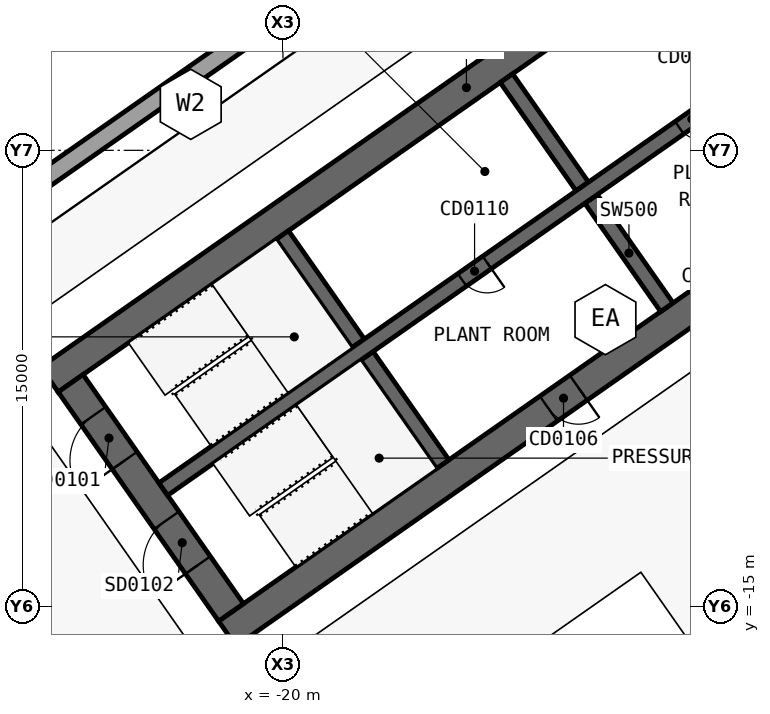
"""IFC4 building model, lengths in metres.
Left out: names, types, materials, properties, quantities, classifications, styles, units other than length and angle.
Written with IfcOpenShell. Run it as: python <this file> out.ifc"""

import sys

from ifc_helpers import new_model, si_unit, direction, frame, frame_2d, origin, place, context, subcontext, project, spatial, polyline, rectangle, outline, extrude, element, fill, save


model = new_model("IFC4")
c1 = context("Model", 3, precision=1e-05, world=origin(), true_north=direction((0.0, 1.0)))
c2 = subcontext(c1, "Body", "Model", "MODEL_VIEW")
j1 = project(units=[si_unit("LENGTHUNIT", "METRE"), si_unit("PLANEANGLEUNIT", "RADIAN")], contexts=[c1])
p1 = place(None, origin())
s1 = spatial("IfcSite", under=j1, at=p1, CompositionType="ELEMENT")
p2 = place(p1, origin())
s2 = spatial("IfcBuilding", under=s1, at=p2, CompositionType="ELEMENT")
p3 = place(p2, frame((0.0, 0.0, -9.0)))
s3 = spatial("IfcBuildingStorey", under=s2, at=p3, CompositionType="ELEMENT", Elevation=-9.0)
p4 = place(p3, frame((0.172, 18.676, 0.0), z_axis=(0.0, 0.0, 1.0), x_axis=(-0.819154640404, -0.573572728697, 0.0)))
e1 = element("IfcWall", 1, at=p4, inside=s3, PredefinedType="SOLIDWALL", context=c2, shape_type="SweptSolid", body=[
    extrude(outline(polyline([(34.922, 0.3), (35.633, -0.198), (35.633, -0.3), (28.946, -0.3), (0.638, -0.3), (0.42, 0.3), (34.922, 0.3)])), origin(), (0.0, 0.0, 1.0), 4.5),
])
p5 = place(p3, frame((0.037, 11.867, 0.0), z_axis=(0.0, 0.0, 1.0), x_axis=(-0.819155306259, -0.573571777746, 0.0)))
e2 = element("IfcWall", 2, at=p5, inside=s3, PredefinedType="SHEAR", context=c2, shape_type="SweptSolid", body=[
    extrude(outline(polyline([(33.837, 0.5), (0.7, 0.5), (0.0, -0.5), (33.837, -0.5), (33.837, 0.5)])), origin(), (0.0, 0.0, 1.0), 4.5),
])
p6 = place(p3, frame((0.037, -0.585, 0.0), z_axis=(0.0, 0.0, 1.0), x_axis=(-0.819157152511, -0.573569140985, 0.0)))
e3 = element("IfcWall", 3, at=p6, inside=s3, PredefinedType="SHEAR", context=c2, shape_type="SweptSolid", body=[
    extrude(outline(polyline([(26.695, 0.5), (0.7, 0.5), (0.0, -0.5), (26.695, -0.5), (26.695, 0.5)])), origin(), (0.0, 0.0, 1.0), 4.5),
])
p7 = place(p6, frame((3.895, 0.0, 0.0)))
e4 = element("IfcOpeningElement", 4, at=p7, cuts=e3, PredefinedType="OPENING", context=c2, shape_type="SweptSolid", body=[
    extrude(rectangle(XDim=1.2, YDim=2.1, at=frame_2d((0.6, 1.05))), frame((0.0, 0.51, 0.0), z_axis=(0.0, -1.0, 0.0), x_axis=(1.0, 0.0, 0.0)), (0.0, 0.0, 1.0), 1.02),
])
p8 = place(p6, frame((12.595, 0.0, 0.0)))
e5 = element("IfcOpeningElement", 5, at=p8, cuts=e3, PredefinedType="OPENING", context=c2, shape_type="SweptSolid", body=[
    extrude(rectangle(XDim=1.2, YDim=2.1, at=frame_2d((0.6, 1.05))), frame((0.0, 0.51, 0.0), z_axis=(0.0, -1.0, 0.0), x_axis=(1.0, 0.0, 0.0)), (0.0, 0.0, 1.0), 1.02),
])
p9 = place(p3, frame((-21.708, -15.2, 0.0), z_axis=(0.0, 0.0, 1.0), x_axis=(-0.573576324356, 0.819152122709, 0.0)))
e6 = element("IfcWall", 6, at=p9, inside=s3, PredefinedType="SHEAR", context=c2, shape_type="SweptSolid", body=[
    extrude(outline(polyline([(0.0, 0.5), (0.0, -0.5), (9.2, -0.5), (9.2, 0.5), (0.0, 0.5)])), origin(), (0.0, 0.0, 1.0), 4.5),
])
p10 = place(p9, frame((6.1, 0.0, 0.0)))
e7 = element("IfcOpeningElement", 7, at=p10, cuts=e6, PredefinedType="OPENING", context=c2, shape_type="SweptSolid", body=[
    extrude(rectangle(XDim=1.8, YDim=2.1, at=frame_2d((0.9, 1.05))), frame((0.0, 0.51, 0.0), z_axis=(0.0, -1.0, 0.0), x_axis=(1.0, 0.0, 0.0)), (0.0, 0.0, 1.0), 1.02),
])
p11 = place(p9, frame((1.9, 0.0, 0.0)))
e8 = element("IfcOpeningElement", 8, at=p11, cuts=e6, PredefinedType="OPENING", context=c2, shape_type="SweptSolid", body=[
    extrude(rectangle(XDim=1.8, YDim=2.1, at=frame_2d((0.9, 1.05))), frame((0.0, 0.51, 0.0), z_axis=(0.0, -1.0, 0.0), x_axis=(1.0, 0.0, 0.0)), (0.0, 0.0, 1.0), 1.02),
])
p12 = place(p3, frame((-7.372, -5.162, 0.0), z_axis=(0.0, 0.0, 1.0), x_axis=(-0.573594173421, 0.819139624372, 0.0)))
e9 = element("IfcWall", 9, at=p12, inside=s3, PredefinedType="SHEAR", context=c2, shape_type="SweptSolid", body=[
    extrude(outline(polyline([(4.35, 0.25), (0.0, 0.25), (0.0, -0.25), (4.35, -0.25), (4.35, 0.25)])), origin(), (0.0, 0.0, 1.0), 4.5),
])
p13 = place(p3, frame((-10.154, -1.189, 0.0), z_axis=(0.0, 0.0, 1.0), x_axis=(-0.573594173421, 0.819139624372, 0.0)))
e10 = element("IfcWall", 10, at=p13, inside=s3, PredefinedType="SHEAR", context=c2, shape_type="SweptSolid", body=[
    extrude(outline(polyline([(4.35, -0.25), (4.35, 0.25), (-0.0, 0.25), (-0.0, -0.25), (4.35, -0.25)])), origin(), (0.0, 0.0, 1.0), 4.5),
])
p14 = place(p3, frame((-14.745, -10.324, 0.0), z_axis=(0.0, 0.0, 1.0), x_axis=(-0.57356780395, 0.819158088694, 0.0)))
e11 = element("IfcWall", 11, at=p14, inside=s3, PredefinedType="SHEAR", context=c2, shape_type="SweptSolid", body=[
    extrude(outline(polyline([(4.35, 0.25), (0.0, 0.25), (0.0, -0.25), (4.35, -0.25), (4.35, 0.25)])), origin(), (0.0, 0.0, 1.0), 4.5),
])
p15 = place(p3, frame((-17.527, -6.352, 0.0), z_axis=(0.0, 0.0, 1.0), x_axis=(-0.573530143085, 0.819184457233, 0.0)))
e12 = element("IfcWall", 12, at=p15, inside=s3, PredefinedType="SHEAR", context=c2, shape_type="SweptSolid", body=[
    extrude(outline(polyline([(4.35, -0.25), (4.35, 0.25), (0.0, 0.25), (0.0, -0.25), (4.35, -0.25)])), origin(), (0.0, 0.0, 1.0), 4.5),
])
p16 = place(p3, frame((-2.638, 3.768, 0.0), z_axis=(0.0, 0.0, 1.0), x_axis=(-0.819148977158, -0.573580816643, 0.0)))
e13 = element("IfcWall", 13, at=p16, inside=s3, PredefinedType="SHEAR", context=c2, shape_type="SweptSolid", body=[
    extrude(outline(polyline([(26.0, 0.25), (0.0, 0.25), (0.0, -0.25), (26.0, -0.25), (26.0, 0.25)])), origin(), (0.0, 0.0, 1.0), 4.5),
])
p17 = place(p16, frame((4.275, 0.0, 0.0)))
e14 = element("IfcOpeningElement", 14, at=p17, cuts=e13, PredefinedType="OPENING", context=c2, shape_type="SweptSolid", body=[
    extrude(rectangle(XDim=1.0, YDim=2.1, at=frame_2d((0.5, 1.05))), frame((0.0, 0.26, 0.0), z_axis=(0.0, -1.0, 0.0), x_axis=(1.0, 0.0, 0.0)), (0.0, 0.0, 1.0), 0.52),
])
p18 = place(p16, frame((13.0, 0.0, 0.0)))
e15 = element("IfcOpeningElement", 15, at=p18, cuts=e13, PredefinedType="OPENING", context=c2, shape_type="SweptSolid", body=[
    extrude(rectangle(XDim=1.0, YDim=2.1, at=frame_2d((0.5, 1.05))), frame((0.0, 0.26, 0.0), z_axis=(0.0, -1.0, 0.0), x_axis=(1.0, 0.0, 0.0)), (0.0, 0.0, 1.0), 0.52),
])
p19 = place(p17, origin())
e16 = element("IfcDoor", 16, at=p19, inside=s3, OperationType="SINGLE_SWING_RIGHT", PredefinedType="DOOR", context=c2, shape_type="SweptSolid", body=[
    extrude(rectangle(XDim=1.0, YDim=2.1, at=frame_2d((0.5, 1.05))), frame((0.0, 0.025, 0.0), z_axis=(0.0, -1.0, 0.0), x_axis=(1.0, 0.0, 0.0)), (0.0, 0.0, 1.0), 0.05),
])
fill(e14, e16)
p20 = place(p18, origin())
e17 = element("IfcDoor", 17, at=p20, inside=s3, OperationType="SINGLE_SWING_RIGHT", PredefinedType="DOOR", context=c2, shape_type="SweptSolid", body=[
    extrude(rectangle(XDim=1.0, YDim=2.1, at=frame_2d((0.5, 1.05))), frame((0.0, 0.025, 0.0), z_axis=(0.0, -1.0, 0.0), x_axis=(1.0, 0.0, 0.0)), (0.0, 0.0, 1.0), 0.05),
])
fill(e15, e17)
p21 = place(p8, origin())
e18 = element("IfcDoor", 18, at=p21, inside=s3, OperationType="SINGLE_SWING_RIGHT", PredefinedType="DOOR", context=c2, shape_type="SweptSolid", body=[
    extrude(rectangle(XDim=1.2, YDim=2.1, at=frame_2d((0.6, 1.05))), frame((0.0, 0.025, 0.0), z_axis=(0.0, -1.0, 0.0), x_axis=(1.0, 0.0, 0.0)), (0.0, 0.0, 1.0), 0.05),
])
fill(e5, e18)
p22 = place(p10, origin())
e19 = element("IfcDoor", 19, at=p22, inside=s3, OperationType="DOUBLE_DOOR_SINGLE_SWING", PredefinedType="DOOR", context=c2, shape_type="SweptSolid", body=[
    extrude(rectangle(XDim=1.8, YDim=2.1, at=frame_2d((0.9, 1.05))), frame((0.0, 0.025, 0.0), z_axis=(0.0, -1.0, 0.0), x_axis=(1.0, 0.0, 0.0)), (0.0, 0.0, 1.0), 0.05),
])
fill(e7, e19)
p23 = place(p11, origin())
e20 = element("IfcDoor", 20, at=p23, inside=s3, OperationType="DOUBLE_DOOR_SINGLE_SWING", PredefinedType="DOOR", context=c2, shape_type="SweptSolid", body=[
    extrude(rectangle(XDim=1.8, YDim=2.1, at=frame_2d((0.9, 1.05))), frame((0.0, 0.025, 0.0), z_axis=(0.0, -1.0, 0.0), x_axis=(1.0, 0.0, 0.0)), (0.0, 0.0, 1.0), 0.05),
])
fill(e8, e20)
save(model, sys.argv[1])
